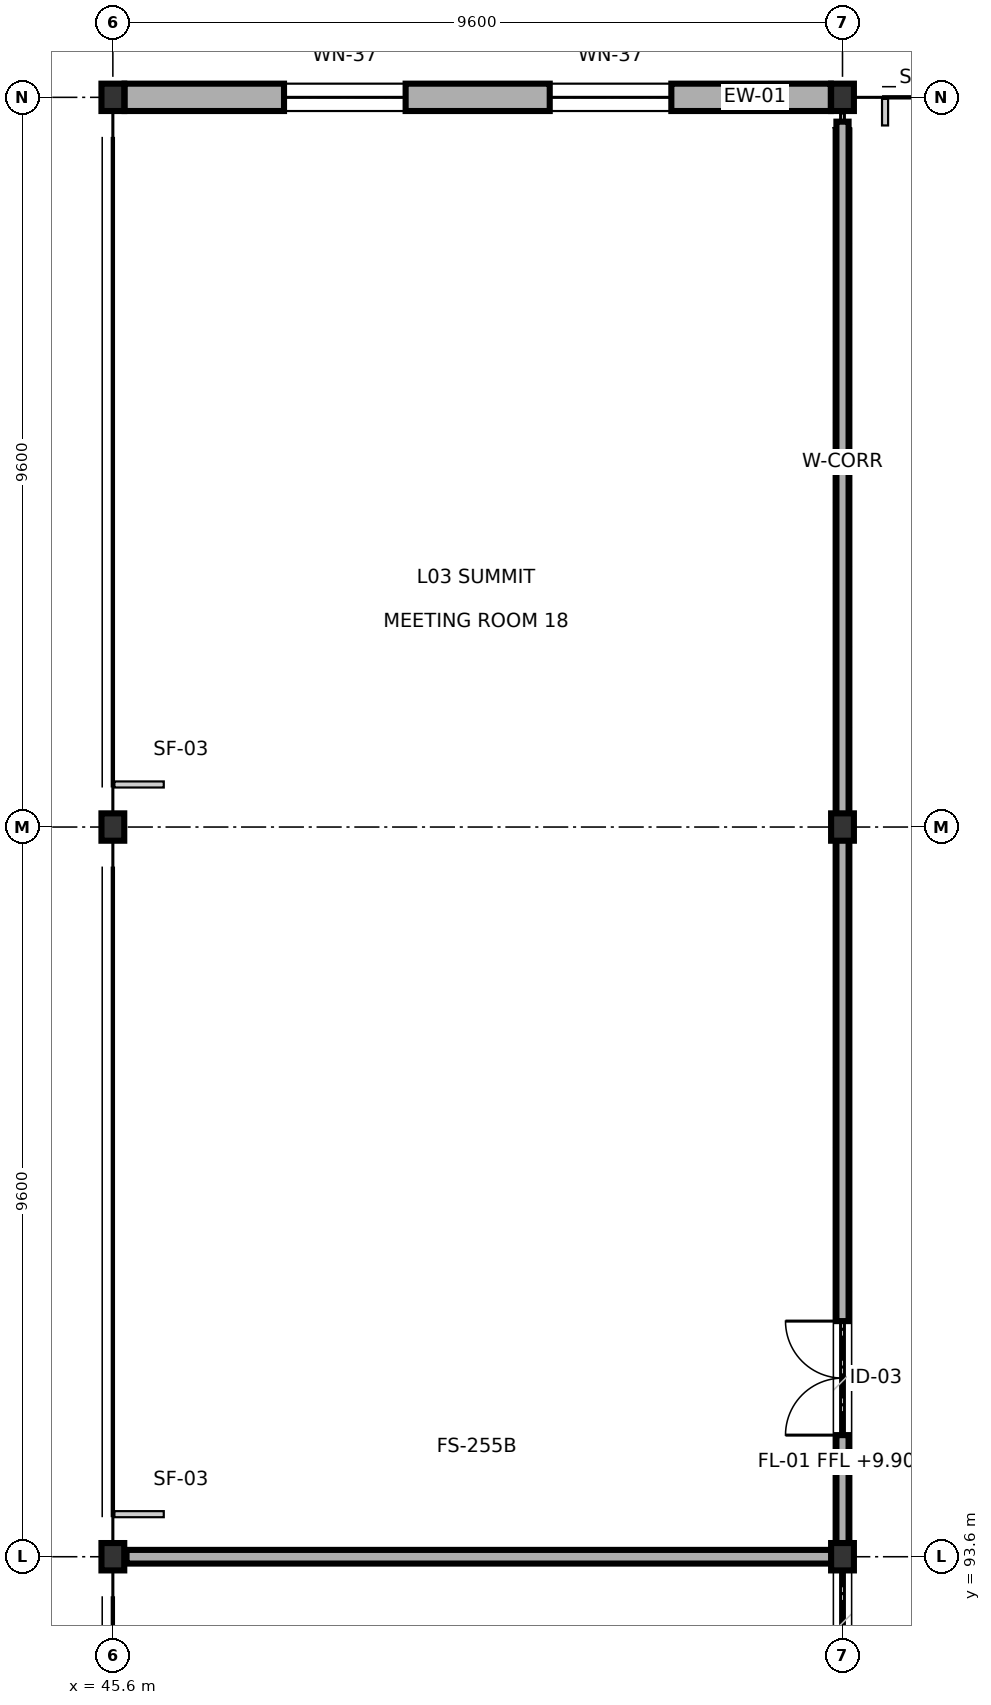
"""IFC4 building model, lengths in metres.
Left out: names, types, materials, properties, quantities, classifications, styles, units other than length and angle.
Written with IfcOpenShell. Run it as: python <this file> out.ifc"""

import sys

from ifc_helpers import new_model, si_unit, direction, frame, frame_2d, origin, origin_2d, place, context, subcontext, project, spatial, rectangle, i_section, extrude, element, fill, save


model = new_model("IFC4")
c1 = context("Model", 3, precision=1e-05, world=origin(), true_north=direction((0.0, 1.0)))
c2 = subcontext(c1, "Body", "Model", "MODEL_VIEW")
j1 = project(units=[si_unit("LENGTHUNIT", "METRE"), si_unit("PLANEANGLEUNIT", "RADIAN")], contexts=[c1])
p1 = place(None, origin())
s1 = spatial("IfcSite", under=j1, at=p1, CompositionType="ELEMENT")
p2 = place(p1, origin())
s2 = spatial("IfcBuilding", under=s1, at=p2, CompositionType="ELEMENT")
p3 = place(p2, frame((0.0, 0.0, 9.9)))
s3 = spatial("IfcBuildingStorey", under=s2, at=p3, CompositionType="ELEMENT", Elevation=9.9)
for number, where, z_axis, x_axis in (
    (1, (45.6, 93.6, 0.0), (0.0, 0.0, 1.0), (1.0, 0.0, 0.0)),
    (2, (45.6, 103.2, 0.0), (0.0, 0.0, 1.0), (1.0, 0.0, 0.0)),
    (3, (45.6, 112.8, 0.0), (0.0, 0.0, 1.0), (1.0, 0.0, 0.0)),
    (4, (55.2, 93.6, 0.0), (0.0, 0.0, 1.0), (1.0, 0.0, 0.0)),
    (5, (55.2, 103.2, 0.0), (0.0, 0.0, 1.0), (1.0, 0.0, 0.0)),
    (6, (55.2, 112.8, 0.0), (0.0, 0.0, 1.0), (1.0, 0.0, 0.0)),
):
    element("IfcColumn", number, at=place(p3, frame(where, z_axis=z_axis, x_axis=x_axis)), inside=s3, PredefinedType="COLUMN", context=c2, shape_type="SweptSolid", body=[
        extrude(i_section(OverallWidth=0.3, OverallDepth=0.36, WebThickness=0.012, FlangeThickness=0.022, FilletRadius=0.027, at=origin_2d()), origin(), (0.0, 0.0, 1.0), 4.8),
    ])
p4 = place(p3, frame((45.754, 112.8, 0.0), z_axis=(0.0, 0.0, 1.0), x_axis=(1.0, 0.0, 0.0)))
e7 = element("IfcWall", 7, at=p4, inside=s3, PredefinedType="SOLIDWALL", context=c2, shape_type="SweptSolid", body=[
    extrude(rectangle(XDim=9.292, YDim=0.36, at=frame_2d((4.646, 0.0))), origin(), (0.0, 0.0, 1.0), 4.025),
])
p5 = place(p4, frame((2.098, 0.0, 0.75)))
e8 = element("IfcOpeningElement", 8, at=p5, cuts=e7, PredefinedType="OPENING", context=c2, shape_type="SweptSolid", body=[
    extrude(rectangle(XDim=1.6, YDim=2.3, at=frame_2d((0.8, 1.15))), frame((0.0, 0.19, 0.0), z_axis=(0.0, -1.0, 0.0), x_axis=(1.0, 0.0, 0.0)), (0.0, 0.0, 1.0), 0.38),
])
p6 = place(p4, frame((5.594, 0.0, 0.75)))
e9 = element("IfcOpeningElement", 9, at=p6, cuts=e7, PredefinedType="OPENING", context=c2, shape_type="SweptSolid", body=[
    extrude(rectangle(XDim=1.6, YDim=2.3, at=frame_2d((0.8, 1.15))), frame((0.0, 0.19, 0.0), z_axis=(0.0, -1.0, 0.0), x_axis=(1.0, 0.0, 0.0)), (0.0, 0.0, 1.0), 0.38),
])
p7 = place(p3, frame((55.2, 93.7, 0.0), z_axis=(0.0, 0.0, 1.0), x_axis=(0.0, 1.0, 0.0)))
e10 = element("IfcWall", 10, at=p7, inside=s3, PredefinedType="PARTITIONING", context=c2, shape_type="SweptSolid", body=[
    extrude(rectangle(XDim=18.78, YDim=0.16, at=frame_2d((9.39, 0.0))), origin(), (0.0, 0.0, 1.0), 4.025),
])
p8 = place(p7, frame((1.5, 0.0, 0.0)))
e11 = element("IfcOpeningElement", 11, at=p8, cuts=e10, PredefinedType="OPENING", context=c2, shape_type="SweptSolid", body=[
    extrude(rectangle(XDim=1.5, YDim=2.25, at=frame_2d((0.75, 1.125))), frame((0.0, 0.09, 0.0), z_axis=(0.0, -1.0, 0.0), x_axis=(1.0, 0.0, 0.0)), (0.0, 0.0, 1.0), 0.18),
])
p9 = place(p3, frame((45.78, 93.6, 0.0), z_axis=(0.0, 0.0, 1.0), x_axis=(1.0, 0.0, 0.0)))
e12 = element("IfcWall", 12, at=p9, inside=s3, PredefinedType="PARTITIONING", context=c2, shape_type="SweptSolid", body=[
    extrude(rectangle(XDim=9.33, YDim=0.18, at=frame_2d((4.665, 0.0))), origin(), (0.0, 0.0, 1.0), 4.025),
])
p10 = place(p5, origin())
e13 = element("IfcWindow", 13, at=p10, inside=s3, PartitioningType="SINGLE_PANEL", PredefinedType="WINDOW", context=c2, shape_type="SweptSolid", body=[
    extrude(rectangle(XDim=1.6, YDim=2.3, at=frame_2d((0.8, 1.15))), frame((0.0, 0.03, 0.0), z_axis=(0.0, -1.0, 0.0), x_axis=(1.0, 0.0, 0.0)), (0.0, 0.0, 1.0), 0.06),
])
fill(e8, e13)
p11 = place(p6, origin())
e14 = element("IfcWindow", 14, at=p11, inside=s3, PartitioningType="SINGLE_PANEL", PredefinedType="WINDOW", context=c2, shape_type="SweptSolid", body=[
    extrude(rectangle(XDim=1.6, YDim=2.3, at=frame_2d((0.8, 1.15))), frame((0.0, 0.03, 0.0), z_axis=(0.0, -1.0, 0.0), x_axis=(1.0, 0.0, 0.0)), (0.0, 0.0, 1.0), 0.06),
])
fill(e9, e14)
p12 = place(p8, origin())
e15 = element("IfcDoor", 15, at=p12, inside=s3, OperationType="DOUBLE_DOOR_SINGLE_SWING", PredefinedType="DOOR", context=c2, shape_type="SweptSolid", body=[
    extrude(rectangle(XDim=1.5, YDim=2.25, at=frame_2d((0.75, 1.125))), frame((0.0, 0.025, 0.0), z_axis=(0.0, -1.0, 0.0), x_axis=(1.0, 0.0, 0.0)), (0.0, 0.0, 1.0), 0.05),
])
fill(e11, e15)
save(model, sys.argv[1])
